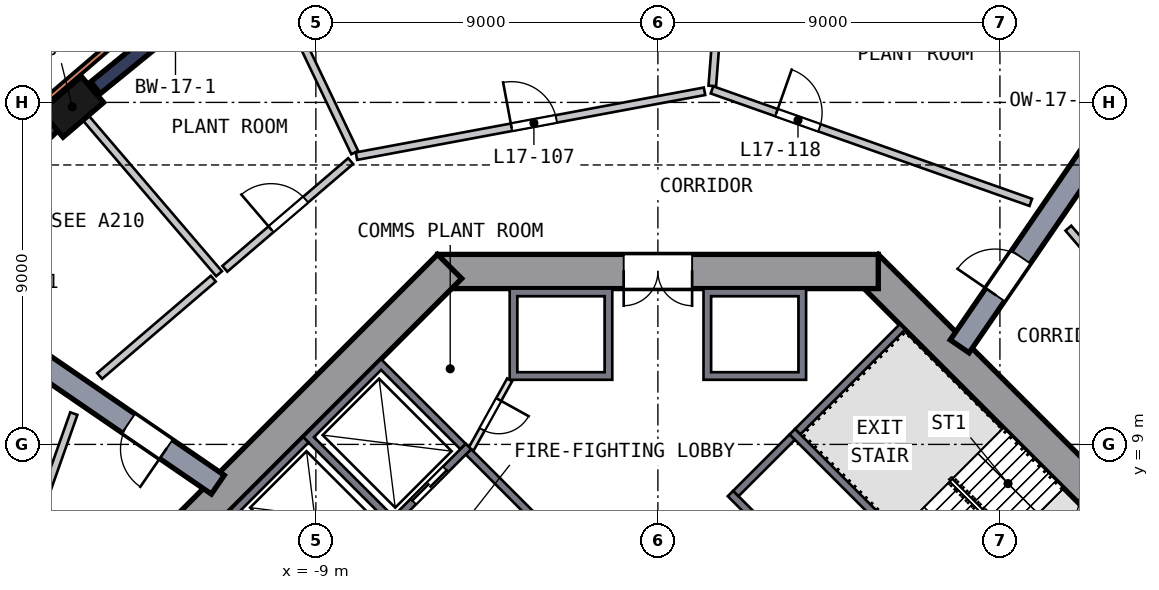
"""IFC4 building model, lengths in metres.
Left out: names, types, materials, properties, quantities, classifications, styles, units other than length and angle.
Written with IfcOpenShell. Run it as: python <this file> out.ifc"""

import sys

from ifc_helpers import new_model, si_unit, direction, frame, frame_2d, origin, origin_2d, place, context, subcontext, project, spatial, polyline, rectangle, outline, extrude, element, fill, save


model = new_model("IFC4")
c1 = context("Model", 3, precision=1e-05, world=origin(), true_north=direction((0.0, 1.0)))
c2 = subcontext(c1, "Body", "Model", "MODEL_VIEW")
j1 = project(units=[si_unit("LENGTHUNIT", "METRE"), si_unit("PLANEANGLEUNIT", "RADIAN")], contexts=[c1])
p1 = place(None, origin())
s1 = spatial("IfcSite", under=j1, at=p1, CompositionType="ELEMENT")
p2 = place(p1, origin())
s2 = spatial("IfcBuilding", under=s1, at=p2, CompositionType="ELEMENT")
p3 = place(p2, frame((0.0, 0.0, 75.0)))
s3 = spatial("IfcBuildingStorey", under=s2, at=p3, CompositionType="ELEMENT", Elevation=75.0)
p4 = place(p3, frame((-15.351, 17.936, 0.0), z_axis=(-0.049588704, -0.043146504, 0.997837331), x_axis=(-0.758262845, -0.64862709, -0.065729414)))
e1 = element("IfcColumn", 1, at=p4, inside=s3, PredefinedType="COLUMN", context=c2, shape_type="SweptSolid", body=[
    extrude(rectangle(XDim=1.4, YDim=0.9, at=origin_2d()), origin(), (0.0, 0.0, 1.0), 4.51),
])
p5 = place(p3, frame((13.682, 5.481, 0.0), z_axis=(0.0, 0.0, 1.0), x_axis=(-0.707106781, 0.707106781, 0.0)))
e2 = element("IfcWall", 2, at=p5, inside=s3, PredefinedType="SHEAR", context=c2, shape_type="SweptSolid", body=[
    extrude(rectangle(XDim=11.598, YDim=0.9, at=frame_2d((5.799, 0.0))), origin(), (0.0, 0.0, 1.0), 6.0),
])
p6 = place(p5, frame((2.099, 0.0, 0.0)))
e3 = element("IfcOpeningElement", 3, at=p6, cuts=e2, PredefinedType="OPENING", context=c2, shape_type="SweptSolid", body=[
    extrude(rectangle(XDim=1.2, YDim=2.1, at=frame_2d((0.6, 1.05))), frame((0.0, 0.46, 0.0), z_axis=(0.0, -1.0, 0.0), x_axis=(1.0, 0.0, 0.0)), (0.0, 0.0, 1.0), 0.92),
])
p7 = place(p3, frame((5.799, 13.55, 0.0), z_axis=(0.0, 0.0, 1.0), x_axis=(-1.0, 0.0, 0.0)))
e4 = element("IfcWall", 4, at=p7, inside=s3, PredefinedType="SHEAR", context=c2, shape_type="SweptSolid", body=[
    extrude(rectangle(XDim=11.598, YDim=0.9, at=frame_2d((5.799, 0.0))), origin(), (0.0, 0.0, 1.0), 6.0),
])
p8 = place(p7, frame((4.899, 0.0, 0.0)))
e5 = element("IfcOpeningElement", 5, at=p8, cuts=e4, PredefinedType="OPENING", context=c2, shape_type="SweptSolid", body=[
    extrude(rectangle(XDim=1.8, YDim=2.1, at=frame_2d((0.9, 1.05))), frame((0.0, 0.46, 0.0), z_axis=(0.0, -1.0, 0.0), x_axis=(1.0, 0.0, 0.0)), (0.0, 0.0, 1.0), 0.92),
])
p9 = place(p3, frame((-5.481, 13.682, 0.0), z_axis=(0.0, 0.0, 1.0), x_axis=(-0.707106781, -0.707106781, 0.0)))
e6 = element("IfcWall", 6, at=p9, inside=s3, PredefinedType="SHEAR", context=c2, shape_type="SweptSolid", body=[
    extrude(rectangle(XDim=11.598, YDim=0.9, at=frame_2d((5.799, 0.0))), origin(), (0.0, 0.0, 1.0), 6.0),
])
p10 = place(p3, frame((-10.588, 21.816, 0.0), z_axis=(0.0, 0.0, 1.0), x_axis=(-0.775345008, -0.6315379, 0.0)))
e7 = element("IfcWall", 7, at=p10, inside=s3, PredefinedType="SHEAR", context=c2, shape_type="SweptSolid", body=[
    extrude(rectangle(XDim=5.433, YDim=0.4, at=frame_2d((2.716, 0.0))), origin(), (0.0, 0.0, 1.0), 4.5),
])
p11 = place(p3, frame((-15.876, 17.444, 0.0), z_axis=(0.0, 0.0, 1.0), x_axis=(-0.729873203, -0.683582553, 0.0)))
e8 = element("IfcWall", 8, at=p11, inside=s3, PredefinedType="SHEAR", context=c2, shape_type="SweptSolid", body=[
    extrude(rectangle(XDim=4.757, YDim=0.4, at=frame_2d((2.379, 0.0))), origin(), (0.0, 0.0, 1.0), 4.5),
])
p12 = place(p3, frame((-11.58, 7.941, 0.0), z_axis=(0.0, 0.0, 1.0), x_axis=(-0.824719758, 0.565541617, 0.0)))
e9 = element("IfcWall", 9, at=p12, inside=s3, PredefinedType="SHEAR", context=c2, shape_type="SweptSolid", body=[
    extrude(rectangle(XDim=9.66, YDim=0.6, at=frame_2d((4.83, 0.0))), origin(), (0.0, 0.0, 1.0), 4.5),
])
p13 = place(p12, frame((1.65, 0.0, 0.0)))
e10 = element("IfcOpeningElement", 10, at=p13, cuts=e9, PredefinedType="OPENING", context=c2, shape_type="SweptSolid", body=[
    extrude(rectangle(XDim=1.2, YDim=2.1, at=frame_2d((0.6, 1.05))), frame((0.0, 0.31, 0.0), z_axis=(0.0, -1.0, 0.0), x_axis=(1.0, 0.0, 0.0)), (0.0, 0.0, 1.0), 0.62),
])
p14 = place(p3, frame((7.941, 11.58, 0.0), z_axis=(0.0, 0.0, 1.0), x_axis=(0.565541617, 0.824719758, 0.0)))
e11 = element("IfcWall", 11, at=p14, inside=s3, PredefinedType="SHEAR", context=c2, shape_type="SweptSolid", body=[
    extrude(rectangle(XDim=9.66, YDim=0.6, at=frame_2d((4.83, 0.0))), origin(), (0.0, 0.0, 1.0), 4.5),
])
p15 = place(p14, frame((1.65, 0.0, 0.0)))
e12 = element("IfcOpeningElement", 12, at=p15, cuts=e11, PredefinedType="OPENING", context=c2, shape_type="SweptSolid", body=[
    extrude(rectangle(XDim=1.2, YDim=2.1, at=frame_2d((0.6, 1.05))), frame((0.0, 0.31, 0.0), z_axis=(0.0, -1.0, 0.0), x_axis=(1.0, 0.0, 0.0)), (0.0, 0.0, 1.0), 0.62),
])
p16 = place(p3, frame((-10.778, 22.607, 0.0), z_axis=(0.0, 0.0, 1.0), x_axis=(-0.759721378, -0.650248743, 0.0)))
e13 = element("IfcWall", 13, at=p16, inside=s3, PredefinedType="SOLIDWALL", context=c2, shape_type="SweptSolid", body=[
    extrude(rectangle(XDim=13.046, YDim=0.15, at=frame_2d((6.523, 0.0))), origin(), (0.0, 0.0, 1.0), 4.5),
])
p17 = place(p3, origin())
e14 = element("IfcWall", 14, at=p17, inside=s3, PredefinedType="SOLIDWALL", context=c2, shape_type="SweptSolid", body=[
    extrude(outline(polyline([(1.2, 13.1), (3.9, 13.1), (3.9, 10.7), (1.2, 10.7), (1.2, 13.1)]), holes=[polyline([(3.7, 10.9), (3.7, 12.9), (1.4, 12.9), (1.4, 10.9), (3.7, 10.9)])]), origin(), (0.0, 0.0, 1.0), 5.55),
])
p18 = place(p3, origin())
e15 = element("IfcWall", 15, at=p18, inside=s3, PredefinedType="SOLIDWALL", context=c2, shape_type="SweptSolid", body=[
    extrude(outline(polyline([(-3.9, 10.7), (-3.9, 13.1), (-1.2, 13.1), (-1.2, 10.7), (-3.9, 10.7)]), holes=[polyline([(-1.4, 12.9), (-3.7, 12.9), (-3.7, 10.9), (-1.4, 10.9), (-1.4, 12.9)])]), origin(), (0.0, 0.0, 1.0), 5.55),
])
p19 = place(p3, origin())
e16 = element("IfcWall", 16, at=p19, inside=s3, PredefinedType="SOLIDWALL", context=c2, shape_type="SweptSolid", body=[
    extrude(outline(polyline([(-9.334, 9.192), (-7.283, 11.243), (-5.056, 9.016), (-5.197, 8.874), (-7.283, 10.96), (-9.051, 9.192), (-6.965, 7.106), (-7.106, 6.965), (-9.334, 9.192)])), origin(), (0.0, 0.0, 1.0), 5.55),
])
p20 = place(p3, frame((-4.985, 8.945, 0.0), z_axis=(0.0, 0.0, 1.0), x_axis=(-0.707106781, -0.707106781, 0.0)))
e17 = element("IfcWall", 17, at=p20, inside=s3, PredefinedType="SOLIDWALL", context=c2, shape_type="SweptSolid", body=[
    extrude(rectangle(XDim=2.9, YDim=0.2, at=frame_2d((1.45, 0.0))), origin(), (0.0, 0.0, 1.0), 5.55),
])
p21 = place(p20, frame((0.85, 0.0, 0.0)))
e18 = element("IfcOpeningElement", 18, at=p21, cuts=e17, PredefinedType="OPENING", context=c2, shape_type="SweptSolid", body=[
    extrude(rectangle(XDim=1.2, YDim=2.1, at=frame_2d((0.6, 1.05))), frame((0.0, 0.11, 0.0), z_axis=(0.0, -1.0, 0.0), x_axis=(1.0, 0.0, 0.0)), (0.0, 0.0, 1.0), 0.22),
])
p22 = place(p3, origin())
e19 = element("IfcWall", 19, at=p22, inside=s3, PredefinedType="SOLIDWALL", context=c2, shape_type="SweptSolid", body=[
    extrude(outline(polyline([(-11.243, 7.283), (-9.334, 9.192), (-9.192, 9.051), (-10.96, 7.283), (-8.874, 5.197), (-9.016, 5.056), (-11.243, 7.283)])), origin(), (0.0, 0.0, 1.0), 5.55),
])
p23 = place(p3, frame((3.535, 9.334, 0.0), z_axis=(0.0, 0.0, 1.0), x_axis=(0.707106781, -0.707106781, 0.0)))
e20 = element("IfcWall", 20, at=p23, inside=s3, PredefinedType="SOLIDWALL", context=c2, shape_type="SweptSolid", body=[
    extrude(rectangle(XDim=8.2, YDim=0.2, at=frame_2d((4.1, 0.0))), origin(), (0.0, 0.0, 1.0), 5.55),
])
p24 = place(p23, frame((6.6, 0.0, 0.0)))
e21 = element("IfcOpeningElement", 21, at=p24, cuts=e20, PredefinedType="OPENING", context=c2, shape_type="SweptSolid", body=[
    extrude(rectangle(XDim=1.2, YDim=2.1, at=frame_2d((0.6, 1.05))), frame((0.0, 0.11, 0.0), z_axis=(0.0, -1.0, 0.0), x_axis=(1.0, 0.0, 0.0)), (0.0, 0.0, 1.0), 0.22),
])
p25 = place(p3, frame((3.677, 9.334, 0.0), z_axis=(0.0, 0.0, 1.0), x_axis=(0.707106781, 0.707106781, 0.0)))
e22 = element("IfcWall", 22, at=p25, inside=s3, PredefinedType="SOLIDWALL", context=c2, shape_type="SweptSolid", body=[
    extrude(rectangle(XDim=3.9, YDim=0.2, at=frame_2d((1.95, 0.0))), origin(), (0.0, 0.0, 1.0), 5.55),
])
p26 = place(p3, frame((-3.005, 6.823, 0.0), z_axis=(0.0, 0.0, 1.0), x_axis=(-0.707106781, 0.707106781, 0.0)))
e23 = element("IfcWall", 23, at=p26, inside=s3, PredefinedType="SOLIDWALL", context=c2, shape_type="SweptSolid", body=[
    extrude(rectangle(XDim=2.8, YDim=0.2, at=frame_2d((1.4, 0.0))), origin(), (0.0, 0.0, 1.0), 5.55),
])
p27 = place(p3, frame((-3.9, 10.7, 0.0), z_axis=(0.0, 0.0, 1.0), x_axis=(-0.485692555, -0.874129705, 0.0)))
e24 = element("IfcWall", 24, at=p27, inside=s3, PredefinedType="PARTITIONING", context=c2, shape_type="SweptSolid", body=[
    extrude(rectangle(XDim=2.089, YDim=0.15, at=frame_2d((1.044, 0.0))), origin(), (0.0, 0.0, 1.0), 5.55),
])
p28 = place(p27, frame((0.594, 0.0, 0.0)))
e25 = element("IfcOpeningElement", 25, at=p28, cuts=e24, PredefinedType="OPENING", context=c2, shape_type="SweptSolid", body=[
    extrude(rectangle(XDim=0.9, YDim=2.1, at=frame_2d((0.45, 1.05))), frame((0.0, 0.085, 0.0), z_axis=(0.0, -1.0, 0.0), x_axis=(1.0, 0.0, 0.0)), (0.0, 0.0, 1.0), 0.17),
])
p29 = place(p3, frame((7.708, 1.909, 0.0), z_axis=(0.0, 0.0, 1.0), x_axis=(-0.707106781, 0.707106781, 0.0)))
e26 = element("IfcWall", 26, at=p29, inside=s3, PredefinedType="SOLIDWALL", context=c2, shape_type="SweptSolid", body=[
    extrude(rectangle(XDim=8.2, YDim=0.2, at=frame_2d((4.1, 0.0))), origin(), (0.0, 0.0, 1.0), 5.55),
])
p30 = place(p29, frame((3.5, 0.0, 0.0)))
e27 = element("IfcOpeningElement", 27, at=p30, cuts=e26, PredefinedType="OPENING", context=c2, shape_type="SweptSolid", body=[
    extrude(rectangle(XDim=1.2, YDim=2.1, at=frame_2d((0.6, 1.05))), frame((0.0, 0.11, 0.0), z_axis=(0.0, -1.0, 0.0), x_axis=(1.0, 0.0, 0.0)), (0.0, 0.0, 1.0), 0.22),
])
p31 = place(p3, frame((2.051, 7.708, 0.0), z_axis=(0.0, 0.0, 1.0), x_axis=(0.707106781, 0.707106781, 0.0)))
e28 = element("IfcWall", 28, at=p31, inside=s3, PredefinedType="SOLIDWALL", context=c2, shape_type="SweptSolid", body=[
    extrude(rectangle(XDim=2.1, YDim=0.2, at=frame_2d((1.05, 0.0))), origin(), (0.0, 0.0, 1.0), 5.55),
])
p32 = place(p3, frame((-17.787, 2.96, 0.0), z_axis=(0.0, 0.0, 1.0), x_axis=(0.332834181, 0.94298537, 0.0)))
e29 = element("IfcWall", 29, at=p32, inside=s3, PredefinedType="SOLIDWALL", context=c2, shape_type="SweptSolid", body=[
    extrude(rectangle(XDim=7.265, YDim=0.2, at=frame_2d((3.632, 0.0))), origin(), (0.0, 0.0, 1.0), 4.5),
])
p33 = place(p32, frame((0.2, 0.0, 0.0)))
e30 = element("IfcOpeningElement", 30, at=p33, cuts=e29, PredefinedType="OPENING", context=c2, shape_type="SweptSolid", body=[
    extrude(rectangle(XDim=1.2, YDim=2.1, at=frame_2d((0.6, 1.05))), frame((0.0, 0.11, 0.0), z_axis=(0.0, -1.0, 0.0), x_axis=(1.0, 0.0, 0.0)), (0.0, 0.0, 1.0), 0.22),
])
p34 = place(p3, frame((-11.547, 13.491, 0.0), z_axis=(0.0, 0.0, 1.0), x_axis=(-0.650233927, 0.759734059, 0.0)))
e31 = element("IfcWall", 31, at=p34, inside=s3, PredefinedType="SOLIDWALL", context=c2, shape_type="SweptSolid", body=[
    extrude(rectangle(XDim=6.35, YDim=0.2, at=frame_2d((3.175, 0.0))), origin(), (0.0, 0.0, 1.0), 4.5),
])
p35 = place(p3, frame((-11.699, 13.361, 0.0), z_axis=(0.0, 0.0, 1.0), x_axis=(-0.759716073, -0.650254941, 0.0)))
e32 = element("IfcWall", 32, at=p35, inside=s3, PredefinedType="SOLIDWALL", context=c2, shape_type="SweptSolid", body=[
    extrude(rectangle(XDim=3.937, YDim=0.2, at=frame_2d((1.968, 0.0))), origin(), (0.0, 0.0, 1.0), 4.5),
])
p36 = place(p3, frame((-11.395, 13.622, 0.0), z_axis=(0.0, 0.0, 1.0), x_axis=(0.759742775, 0.650223742, 0.0)))
e33 = element("IfcWall", 33, at=p36, inside=s3, PredefinedType="SOLIDWALL", context=c2, shape_type="SweptSolid", body=[
    extrude(rectangle(XDim=4.358, YDim=0.2, at=frame_2d((2.179, 0.0))), origin(), (0.0, 0.0, 1.0), 4.5),
])
p37 = place(p36, frame((1.6, 0.0, 0.0)))
e34 = element("IfcOpeningElement", 34, at=p37, cuts=e33, PredefinedType="OPENING", context=c2, shape_type="SweptSolid", body=[
    extrude(rectangle(XDim=1.2, YDim=2.1, at=frame_2d((0.6, 1.05))), frame((0.0, 0.11, 0.0), z_axis=(0.0, -1.0, 0.0), x_axis=(1.0, 0.0, 0.0)), (0.0, 0.0, 1.0), 0.22),
])
p38 = place(p3, frame((-7.977, 16.679, 0.0), z_axis=(0.0, 0.0, 1.0), x_axis=(-0.431486765, 0.902119267, 0.0)))
e35 = element("IfcWall", 35, at=p38, inside=s3, PredefinedType="SOLIDWALL", context=c2, shape_type="SweptSolid", body=[
    extrude(rectangle(XDim=5.526, YDim=0.2, at=frame_2d((2.763, 0.0))), origin(), (0.0, 0.0, 1.0), 4.5),
])
p39 = place(p3, frame((-7.932, 16.585, 0.0), z_axis=(0.0, 0.0, 1.0), x_axis=(0.983060939, 0.183278995, 0.0)))
e36 = element("IfcWall", 36, at=p39, inside=s3, PredefinedType="SOLIDWALL", context=c2, shape_type="SweptSolid", body=[
    extrude(rectangle(XDim=9.316, YDim=0.2, at=frame_2d((4.658, 0.0))), origin(), (0.0, 0.0, 1.0), 4.5),
])
p40 = place(p39, frame((4.15, 0.0, 0.0)))
e37 = element("IfcOpeningElement", 37, at=p40, cuts=e36, PredefinedType="OPENING", context=c2, shape_type="SweptSolid", body=[
    extrude(rectangle(XDim=1.2, YDim=2.1, at=frame_2d((0.6, 1.05))), frame((0.0, 0.11, 0.0), z_axis=(0.0, -1.0, 0.0), x_axis=(1.0, 0.0, 0.0)), (0.0, 0.0, 1.0), 0.22),
])
p41 = place(p3, frame((1.933, 24.889, 0.0), z_axis=(0.0, 0.0, 1.0), x_axis=(-0.077399934, -0.997000125, 0.0)))
e38 = element("IfcWall", 38, at=p41, inside=s3, PredefinedType="SOLIDWALL", context=c2, shape_type="SweptSolid", body=[
    extrude(rectangle(XDim=6.476, YDim=0.2, at=frame_2d((3.238, 0.0))), origin(), (0.0, 0.0, 1.0), 4.5),
])
p42 = place(p3, frame((1.423, 18.33, 0.0), z_axis=(0.0, 0.0, 1.0), x_axis=(0.94298476, -0.33283591, 0.0)))
e39 = element("IfcWall", 39, at=p42, inside=s3, PredefinedType="SOLIDWALL", context=c2, shape_type="SweptSolid", body=[
    extrude(rectangle(XDim=8.895, YDim=0.2, at=frame_2d((4.448, 0.0))), origin(), (0.0, 0.0, 1.0), 4.5),
])
p43 = place(p42, frame((1.8, 0.0, 0.0)))
e40 = element("IfcOpeningElement", 40, at=p43, cuts=e39, PredefinedType="OPENING", context=c2, shape_type="SweptSolid", body=[
    extrude(rectangle(XDim=1.2, YDim=2.1, at=frame_2d((0.6, 1.05))), frame((0.0, 0.11, 0.0), z_axis=(0.0, -1.0, 0.0), x_axis=(1.0, 0.0, 0.0)), (0.0, 0.0, 1.0), 0.22),
])
p44 = place(p3, frame((10.801, 14.69, 0.0), z_axis=(0.0, 0.0, 1.0), x_axis=(0.650257786, -0.759713638, 0.0)))
e41 = element("IfcWall", 41, at=p44, inside=s3, PredefinedType="SOLIDWALL", context=c2, shape_type="SweptSolid", body=[
    extrude(rectangle(XDim=8.895, YDim=0.2, at=frame_2d((4.448, 0.0))), origin(), (0.0, 0.0, 1.0), 4.5),
])
p45 = place(p44, frame((5.9, 0.0, 0.0)))
e42 = element("IfcOpeningElement", 42, at=p45, cuts=e41, PredefinedType="OPENING", context=c2, shape_type="SweptSolid", body=[
    extrude(rectangle(XDim=1.2, YDim=2.1, at=frame_2d((0.6, 1.05))), frame((0.0, 0.11, 0.0), z_axis=(0.0, -1.0, 0.0), x_axis=(1.0, 0.0, 0.0)), (0.0, 0.0, 1.0), 0.22),
])
p46 = place(p21, origin())
e43 = element("IfcDoor", 43, at=p46, inside=s3, OperationType="DOUBLE_DOOR_SLIDING", PredefinedType="DOOR", context=c2, shape_type="SweptSolid", body=[
    extrude(rectangle(XDim=1.2, YDim=2.1, at=frame_2d((0.6, 1.05))), frame((0.0, 0.025, 0.0), z_axis=(0.0, -1.0, 0.0), x_axis=(1.0, 0.0, 0.0)), (0.0, 0.0, 1.0), 0.05),
])
fill(e18, e43)
p47 = place(p8, origin())
e44 = element("IfcDoor", 44, at=p47, inside=s3, OperationType="DOUBLE_DOOR_SINGLE_SWING", PredefinedType="DOOR", context=c2, shape_type="SweptSolid", body=[
    extrude(rectangle(XDim=1.8, YDim=2.1, at=frame_2d((0.9, 1.05))), frame((0.0, 0.025, 0.0), z_axis=(0.0, -1.0, 0.0), x_axis=(1.0, 0.0, 0.0)), (0.0, 0.0, 1.0), 0.05),
])
fill(e5, e44)
p48 = place(p28, origin())
e45 = element("IfcDoor", 45, at=p48, inside=s3, OperationType="SINGLE_SWING_LEFT", PredefinedType="DOOR", context=c2, shape_type="SweptSolid", body=[
    extrude(rectangle(XDim=0.9, YDim=2.1, at=frame_2d((0.45, 1.05))), frame((0.0, 0.025, 0.0), z_axis=(0.0, -1.0, 0.0), x_axis=(1.0, 0.0, 0.0)), (0.0, 0.0, 1.0), 0.05),
])
fill(e25, e45)
p49 = place(p13, origin())
e46 = element("IfcDoor", 46, at=p49, inside=s3, OperationType="SINGLE_SWING_LEFT", PredefinedType="DOOR", context=c2, shape_type="SweptSolid", body=[
    extrude(rectangle(XDim=1.2, YDim=2.1, at=frame_2d((0.6, 1.05))), frame((0.0, 0.025, 0.0), z_axis=(0.0, -1.0, 0.0), x_axis=(1.0, 0.0, 0.0)), (0.0, 0.0, 1.0), 0.05),
])
fill(e10, e46)
p50 = place(p15, origin())
e47 = element("IfcDoor", 47, at=p50, inside=s3, OperationType="SINGLE_SWING_LEFT", PredefinedType="DOOR", context=c2, shape_type="SweptSolid", body=[
    extrude(rectangle(XDim=1.2, YDim=2.1, at=frame_2d((0.6, 1.05))), frame((0.0, 0.025, 0.0), z_axis=(0.0, -1.0, 0.0), x_axis=(1.0, 0.0, 0.0)), (0.0, 0.0, 1.0), 0.05),
])
fill(e12, e47)
p51 = place(p40, origin())
e48 = element("IfcDoor", 48, at=p51, inside=s3, OperationType="SINGLE_SWING_LEFT", PredefinedType="DOOR", context=c2, shape_type="SweptSolid", body=[
    extrude(rectangle(XDim=1.2, YDim=2.1, at=frame_2d((0.6, 1.05))), frame((0.0, 0.025, 0.0), z_axis=(0.0, -1.0, 0.0), x_axis=(1.0, 0.0, 0.0)), (0.0, 0.0, 1.0), 0.05),
])
fill(e37, e48)
p52 = place(p37, origin())
e49 = element("IfcDoor", 49, at=p52, inside=s3, OperationType="SINGLE_SWING_LEFT", PredefinedType="DOOR", context=c2, shape_type="SweptSolid", body=[
    extrude(rectangle(XDim=1.2, YDim=2.1, at=frame_2d((0.6, 1.05))), frame((0.0, 0.025, 0.0), z_axis=(0.0, -1.0, 0.0), x_axis=(1.0, 0.0, 0.0)), (0.0, 0.0, 1.0), 0.05),
])
fill(e34, e49)
p53 = place(p43, origin())
e50 = element("IfcDoor", 50, at=p53, inside=s3, OperationType="SINGLE_SWING_LEFT", PredefinedType="DOOR", context=c2, shape_type="SweptSolid", body=[
    extrude(rectangle(XDim=1.2, YDim=2.1, at=frame_2d((0.6, 1.05))), frame((0.0, 0.025, 0.0), z_axis=(0.0, -1.0, 0.0), x_axis=(1.0, 0.0, 0.0)), (0.0, 0.0, 1.0), 0.05),
])
fill(e40, e50)
save(model, sys.argv[1])
